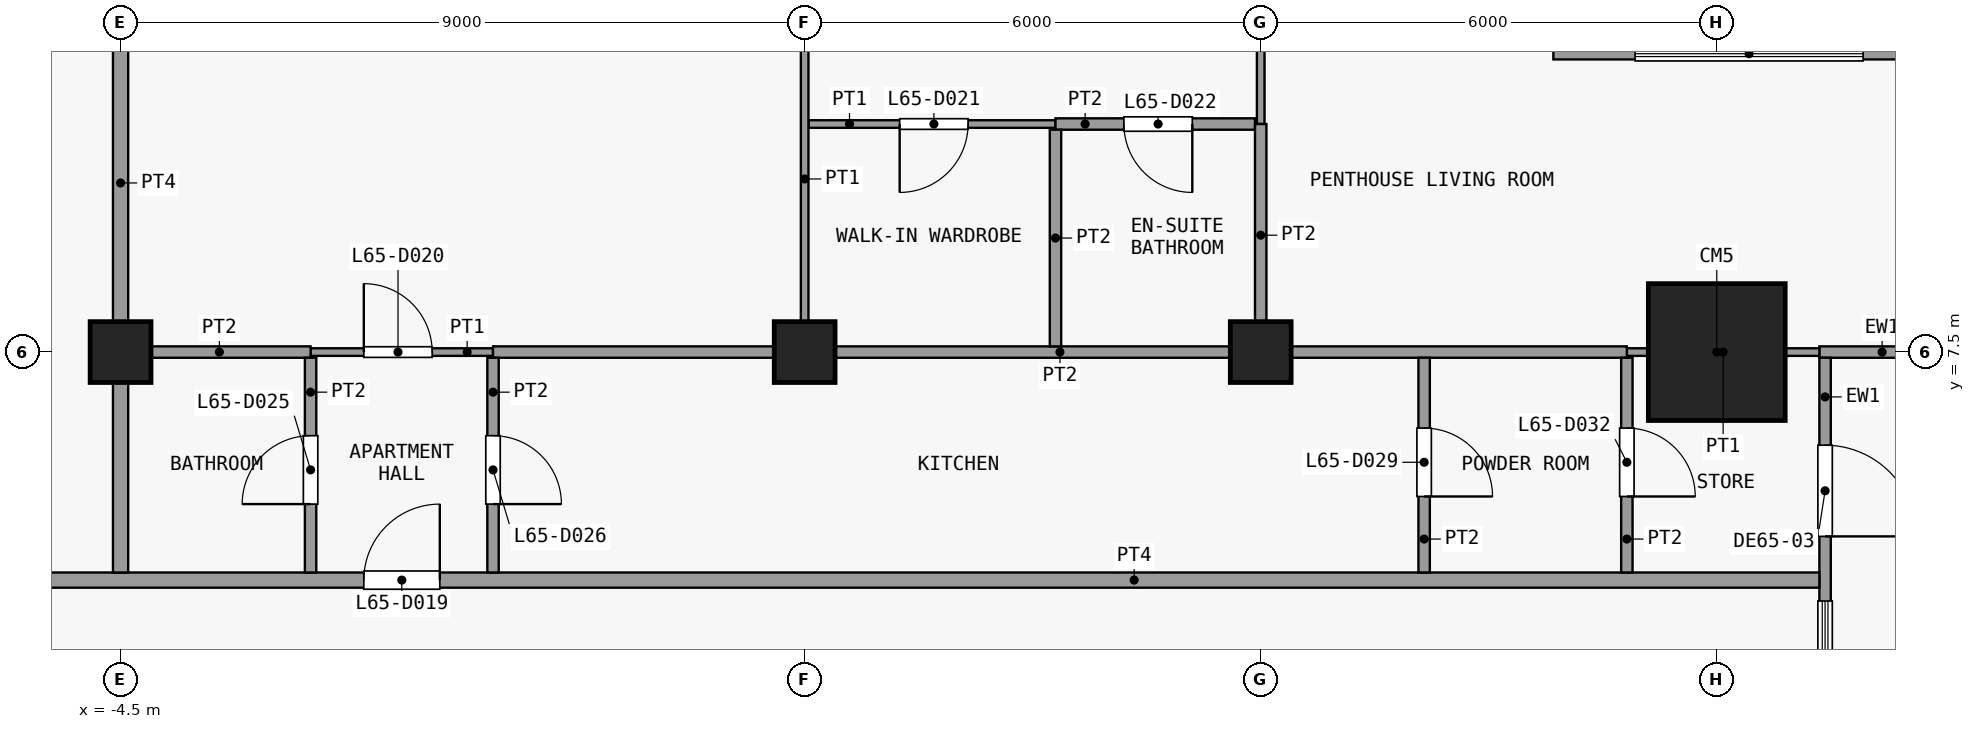
"""IFC4 building model, lengths in metres.
Left out: names, types, materials, properties, quantities, classifications, styles, units other than length and angle.
Written with IfcOpenShell. Run it as: python <this file> out.ifc"""

import sys

from ifc_helpers import new_model, si_unit, direction, frame, frame_2d, origin, origin_2d, place, context, subcontext, project, spatial, rectangle, extrude, element, fill, save


model = new_model("IFC4")
c1 = context("Model", 3, precision=1e-05, world=origin(), true_north=direction((0.0, 1.0)))
c2 = subcontext(c1, "Body", "Model", "MODEL_VIEW")
j1 = project(units=[si_unit("LENGTHUNIT", "METRE"), si_unit("PLANEANGLEUNIT", "RADIAN")], contexts=[c1])
p1 = place(None, origin())
s1 = spatial("IfcSite", under=j1, at=p1, CompositionType="ELEMENT")
p2 = place(p1, origin())
s2 = spatial("IfcBuilding", under=s1, at=p2, CompositionType="ELEMENT")
p3 = place(p2, frame((0.0, 0.0, 259.1)))
s3 = spatial("IfcBuildingStorey", under=s2, at=p3, CompositionType="ELEMENT", Elevation=259.1)
for number, where, z_axis, x_axis in (
    (1, (-4.5, 7.5, 0.0), (0.0, 0.0, 1.0), (1.0, 0.0, 0.0)),
    (2, (4.5, 7.5, 0.0), (0.0, 0.0, 1.0), (1.0, 0.0, 0.0)),
    (3, (10.5, 7.5, 0.0), (0.0, 0.0, 1.0), (1.0, 0.0, 0.0)),
):
    element("IfcColumn", number, at=place(p3, frame(where, z_axis=z_axis, x_axis=x_axis)), inside=s3, PredefinedType="COLUMN", context=c2, shape_type="SweptSolid", body=[
        extrude(rectangle(XDim=0.8, YDim=0.8, at=origin_2d()), origin(), (0.0, 0.0, 1.0), 3.6),
    ])
p4 = place(p3, frame((16.5, 7.5, 0.0), z_axis=(0.0, 0.0, 1.0), x_axis=(1.0, 0.0, 0.0)))
e4 = element("IfcColumn", 4, at=p4, inside=s3, PredefinedType="COLUMN", context=c2, shape_type="SweptSolid", body=[
    extrude(rectangle(XDim=1.8, YDim=1.8, at=origin_2d()), origin(), (0.0, 0.0, 1.0), 3.6),
])
p5 = place(p3, frame((14.35, 11.425, 0.0), z_axis=(0.0, 0.0, 1.0), x_axis=(1.0, 0.0, 0.0)))
e5 = element("IfcWall", 5, at=p5, inside=s3, PredefinedType="SOLIDWALL", context=c2, shape_type="SweptSolid", body=[
    extrude(rectangle(XDim=5.15, YDim=0.15, at=frame_2d((2.575, 0.0))), origin(), (0.0, 0.0, 1.0), 3.3),
])
p6 = place(p5, frame((1.075, 0.0, 0.9)))
e6 = element("IfcOpeningElement", 6, at=p6, cuts=e5, PredefinedType="OPENING", context=c2, shape_type="SweptSolid", body=[
    extrude(rectangle(XDim=3.0, YDim=2.4, at=frame_2d((1.5, 1.2))), frame((0.0, 0.085, 0.0), z_axis=(0.0, -1.0, 0.0), x_axis=(1.0, 0.0, 0.0)), (0.0, 0.0, 1.0), 0.17),
])
p7 = place(p3, frame((17.85, 7.5, 0.0), z_axis=(0.0, 0.0, 1.0), x_axis=(1.0, 0.0, 0.0)))
e7 = element("IfcWall", 7, at=p7, inside=s3, PredefinedType="SOLIDWALL", context=c2, shape_type="SweptSolid", body=[
    extrude(rectangle(XDim=1.65, YDim=0.15, at=frame_2d((0.825, 0.0))), origin(), (0.0, 0.0, 1.0), 3.3),
])
p8 = place(p3, frame((17.925, 7.425, 0.0), z_axis=(0.0, 0.0, 1.0), x_axis=(0.0, -1.0, 0.0)))
e8 = element("IfcWall", 8, at=p8, inside=s3, PredefinedType="SOLIDWALL", context=c2, shape_type="SweptSolid", body=[
    extrude(rectangle(XDim=5.85, YDim=0.15, at=frame_2d((2.925, 0.0))), origin(), (0.0, 0.0, 1.0), 3.3),
])
p9 = place(p8, frame((1.15, 0.0, 0.0)))
e9 = element("IfcOpeningElement", 9, at=p9, cuts=e8, PredefinedType="OPENING", context=c2, shape_type="SweptSolid", body=[
    extrude(rectangle(XDim=1.2, YDim=2.4, at=frame_2d((0.6, 1.2))), frame((0.0, 0.085, 0.0), z_axis=(0.0, -1.0, 0.0), x_axis=(1.0, 0.0, 0.0)), (0.0, 0.0, 1.0), 0.17),
])
p10 = place(p8, frame((3.2, 0.0, 0.9)))
e10 = element("IfcOpeningElement", 10, at=p10, cuts=e8, PredefinedType="OPENING", context=c2, shape_type="SweptSolid", body=[
    extrude(rectangle(XDim=1.8, YDim=2.1, at=frame_2d((0.9, 1.05))), frame((0.0, 0.085, 0.0), z_axis=(0.0, -1.0, 0.0), x_axis=(1.0, 0.0, 0.0)), (0.0, 0.0, 1.0), 0.17),
])
p11 = place(p3, frame((-20.25, 4.5, 0.0), z_axis=(0.0, 0.0, 1.0), x_axis=(1.0, 0.0, 0.0)))
e11 = element("IfcWall", 11, at=p11, inside=s3, PredefinedType="PARTITIONING", context=c2, shape_type="SweptSolid", body=[
    extrude(rectangle(XDim=38.1, YDim=0.2, at=frame_2d((19.05, 0.0))), origin(), (0.0, 0.0, 1.0), 3.3),
])
p12 = place(p11, frame((1.4, 0.0, 0.0)))
e12 = element("IfcOpeningElement", 12, at=p12, cuts=e11, PredefinedType="OPENING", context=c2, shape_type="SweptSolid", body=[
    extrude(rectangle(XDim=0.9, YDim=2.1, at=frame_2d((0.45, 1.05))), frame((0.0, 0.11, 0.0), z_axis=(0.0, -1.0, 0.0), x_axis=(1.0, 0.0, 0.0)), (0.0, 0.0, 1.0), 0.22),
])
p13 = place(p11, frame((6.25, 0.0, 0.0)))
e13 = element("IfcOpeningElement", 13, at=p13, cuts=e11, PredefinedType="OPENING", context=c2, shape_type="SweptSolid", body=[
    extrude(rectangle(XDim=0.9, YDim=2.1, at=frame_2d((0.45, 1.05))), frame((0.0, 0.11, 0.0), z_axis=(0.0, -1.0, 0.0), x_axis=(1.0, 0.0, 0.0)), (0.0, 0.0, 1.0), 0.22),
])
p14 = place(p11, frame((12.25, 0.0, 0.0)))
e14 = element("IfcOpeningElement", 14, at=p14, cuts=e11, PredefinedType="OPENING", context=c2, shape_type="SweptSolid", body=[
    extrude(rectangle(XDim=0.9, YDim=2.1, at=frame_2d((0.45, 1.05))), frame((0.0, 0.11, 0.0), z_axis=(0.0, -1.0, 0.0), x_axis=(1.0, 0.0, 0.0)), (0.0, 0.0, 1.0), 0.22),
])
p15 = place(p11, frame((18.95, 0.0, 0.0)))
e15 = element("IfcOpeningElement", 15, at=p15, cuts=e11, PredefinedType="OPENING", context=c2, shape_type="SweptSolid", body=[
    extrude(rectangle(XDim=1.0, YDim=2.1, at=frame_2d((0.5, 1.05))), frame((0.0, 0.11, 0.0), z_axis=(0.0, -1.0, 0.0), x_axis=(1.0, 0.0, 0.0)), (0.0, 0.0, 1.0), 0.22),
])
p16 = place(p3, frame((-2.0, 7.5, 0.0), z_axis=(0.0, 0.0, 1.0), x_axis=(1.0, 0.0, 0.0)))
e16 = element("IfcWall", 16, at=p16, inside=s3, PredefinedType="PARTITIONING", context=c2, shape_type="SweptSolid", body=[
    extrude(rectangle(XDim=2.4, YDim=0.1, at=frame_2d((1.2, 0.0))), origin(), (0.0, 0.0, 1.0), 3.3),
])
p17 = place(p16, frame((0.7, 0.0, 0.0)))
e17 = element("IfcOpeningElement", 17, at=p17, cuts=e16, PredefinedType="OPENING", context=c2, shape_type="SweptSolid", body=[
    extrude(rectangle(XDim=0.9, YDim=2.1, at=frame_2d((0.45, 1.05))), frame((0.0, 0.06, 0.0), z_axis=(0.0, -1.0, 0.0), x_axis=(1.0, 0.0, 0.0)), (0.0, 0.0, 1.0), 0.12),
])
p18 = place(p3, frame((15.317, 7.5, 0.0), z_axis=(0.0, 0.0, 1.0), x_axis=(1.0, 0.0, 0.0)))
e18 = element("IfcWall", 18, at=p18, inside=s3, PredefinedType="PARTITIONING", context=c2, shape_type="SweptSolid", body=[
    extrude(rectangle(XDim=2.533, YDim=0.1, at=frame_2d((1.267, 0.0))), origin(), (0.0, 0.0, 1.0), 3.3),
])
p19 = place(p3, frame((-4.4, 7.5, 0.0), z_axis=(0.0, 0.0, 1.0), x_axis=(1.0, 0.0, 0.0)))
e19 = element("IfcWall", 19, at=p19, inside=s3, PredefinedType="PARTITIONING", context=c2, shape_type="SweptSolid", body=[
    extrude(rectangle(XDim=2.4, YDim=0.15, at=frame_2d((1.2, 0.0))), origin(), (0.0, 0.0, 1.0), 3.3),
])
p20 = place(p3, frame((0.4, 7.5, 0.0), z_axis=(0.0, 0.0, 1.0), x_axis=(1.0, 0.0, 0.0)))
e20 = element("IfcWall", 20, at=p20, inside=s3, PredefinedType="PARTITIONING", context=c2, shape_type="SweptSolid", body=[
    extrude(rectangle(XDim=14.917, YDim=0.15, at=frame_2d((7.458, 0.0))), origin(), (0.0, 0.0, 1.0), 3.3),
])
p21 = place(p3, frame((4.55, 10.5, 0.0), z_axis=(0.0, 0.0, 1.0), x_axis=(1.0, 0.0, 0.0)))
e21 = element("IfcWall", 21, at=p21, inside=s3, PredefinedType="PARTITIONING", context=c2, shape_type="SweptSolid", body=[
    extrude(rectangle(XDim=3.25, YDim=0.1, at=frame_2d((1.625, 0.0))), origin(), (0.0, 0.0, 1.0), 3.3),
])
p22 = place(p21, frame((1.2, 0.0, 0.0)))
e22 = element("IfcOpeningElement", 22, at=p22, cuts=e21, PredefinedType="OPENING", context=c2, shape_type="SweptSolid", body=[
    extrude(rectangle(XDim=0.9, YDim=2.1, at=frame_2d((0.45, 1.05))), frame((0.0, 0.06, 0.0), z_axis=(0.0, -1.0, 0.0), x_axis=(1.0, 0.0, 0.0)), (0.0, 0.0, 1.0), 0.12),
])
p23 = place(p3, frame((7.8, 10.5, 0.0), z_axis=(0.0, 0.0, 1.0), x_axis=(1.0, 0.0, 0.0)))
e23 = element("IfcWall", 23, at=p23, inside=s3, PredefinedType="PARTITIONING", context=c2, shape_type="SweptSolid", body=[
    extrude(rectangle(XDim=2.625, YDim=0.15, at=frame_2d((1.312, 0.0))), origin(), (0.0, 0.0, 1.0), 3.3),
])
p24 = place(p23, frame((0.9, 0.0, 0.0)))
e24 = element("IfcOpeningElement", 24, at=p24, cuts=e23, PredefinedType="OPENING", context=c2, shape_type="SweptSolid", body=[
    extrude(rectangle(XDim=0.9, YDim=2.1, at=frame_2d((0.45, 1.05))), frame((0.0, 0.085, 0.0), z_axis=(0.0, -1.0, 0.0), x_axis=(1.0, 0.0, 0.0)), (0.0, 0.0, 1.0), 0.17),
])
p25 = place(p3, frame((-4.5, 4.6, 0.0), z_axis=(0.0, 0.0, 1.0), x_axis=(0.0, 1.0, 0.0)))
e25 = element("IfcWall", 25, at=p25, inside=s3, PredefinedType="PARTITIONING", context=c2, shape_type="SweptSolid", body=[
    extrude(rectangle(XDim=10.25, YDim=0.2, at=frame_2d((5.125, 0.0))), origin(), (0.0, 0.0, 1.0), 3.3),
])
p26 = place(p3, frame((-2.0, 4.6, 0.0), z_axis=(0.0, 0.0, 1.0), x_axis=(0.0, 1.0, 0.0)))
e26 = element("IfcWall", 26, at=p26, inside=s3, PredefinedType="PARTITIONING", context=c2, shape_type="SweptSolid", body=[
    extrude(rectangle(XDim=2.825, YDim=0.15, at=frame_2d((1.413, 0.0))), origin(), (0.0, 0.0, 1.0), 3.3),
])
p27 = place(p26, frame((0.9, 0.0, 0.0)))
e27 = element("IfcOpeningElement", 27, at=p27, cuts=e26, PredefinedType="OPENING", context=c2, shape_type="SweptSolid", body=[
    extrude(rectangle(XDim=0.9, YDim=2.1, at=frame_2d((0.45, 1.05))), frame((0.0, 0.085, 0.0), z_axis=(0.0, -1.0, 0.0), x_axis=(1.0, 0.0, 0.0)), (0.0, 0.0, 1.0), 0.17),
])
p28 = place(p3, frame((0.4, 4.6, 0.0), z_axis=(0.0, 0.0, 1.0), x_axis=(0.0, 1.0, 0.0)))
e28 = element("IfcWall", 28, at=p28, inside=s3, PredefinedType="PARTITIONING", context=c2, shape_type="SweptSolid", body=[
    extrude(rectangle(XDim=2.825, YDim=0.15, at=frame_2d((1.413, 0.0))), origin(), (0.0, 0.0, 1.0), 3.3),
])
p29 = place(p28, frame((0.9, 0.0, 0.0)))
e29 = element("IfcOpeningElement", 29, at=p29, cuts=e28, PredefinedType="OPENING", context=c2, shape_type="SweptSolid", body=[
    extrude(rectangle(XDim=0.9, YDim=2.1, at=frame_2d((0.45, 1.05))), frame((0.0, 0.085, 0.0), z_axis=(0.0, -1.0, 0.0), x_axis=(1.0, 0.0, 0.0)), (0.0, 0.0, 1.0), 0.17),
])
p30 = place(p3, frame((4.5, 7.575, 0.0), z_axis=(0.0, 0.0, 1.0), x_axis=(0.0, 1.0, 0.0)))
e30 = element("IfcWall", 30, at=p30, inside=s3, PredefinedType="PARTITIONING", context=c2, shape_type="SweptSolid", body=[
    extrude(rectangle(XDim=7.275, YDim=0.1, at=frame_2d((3.638, 0.0))), origin(), (0.0, 0.0, 1.0), 3.3),
])
p31 = place(p30, frame((4.525, 0.0, 0.0)))
e31 = element("IfcOpeningElement", 31, at=p31, cuts=e30, PredefinedType="OPENING", context=c2, shape_type="SweptSolid", body=[
    extrude(rectangle(XDim=0.9, YDim=2.1, at=frame_2d((0.45, 1.05))), frame((0.0, 0.06, 0.0), z_axis=(0.0, -1.0, 0.0), x_axis=(1.0, 0.0, 0.0)), (0.0, 0.0, 1.0), 0.12),
])
p32 = place(p3, frame((7.8, 7.575, 0.0), z_axis=(0.0, 0.0, 1.0), x_axis=(0.0, 1.0, 0.0)))
e32 = element("IfcWall", 32, at=p32, inside=s3, PredefinedType="PARTITIONING", context=c2, shape_type="SweptSolid", body=[
    extrude(rectangle(XDim=2.85, YDim=0.15, at=frame_2d((1.425, 0.0))), origin(), (0.0, 0.0, 1.0), 3.3),
])
p33 = place(p3, frame((10.5, 10.5, 0.0), z_axis=(0.0, 0.0, 1.0), x_axis=(0.0, 1.0, 0.0)))
e33 = element("IfcWall", 33, at=p33, inside=s3, PredefinedType="PARTITIONING", context=c2, shape_type="SweptSolid", body=[
    extrude(rectangle(XDim=4.35, YDim=0.1, at=frame_2d((2.175, 0.0))), origin(), (0.0, 0.0, 1.0), 3.3),
])
p34 = place(p33, frame((1.6, 0.0, 0.0)))
e34 = element("IfcOpeningElement", 34, at=p34, cuts=e33, PredefinedType="OPENING", context=c2, shape_type="SweptSolid", body=[
    extrude(rectangle(XDim=0.9, YDim=2.1, at=frame_2d((0.45, 1.05))), frame((0.0, 0.06, 0.0), z_axis=(0.0, -1.0, 0.0), x_axis=(1.0, 0.0, 0.0)), (0.0, 0.0, 1.0), 0.12),
])
p35 = place(p3, frame((10.5, 7.575, 0.0), z_axis=(0.0, 0.0, 1.0), x_axis=(0.0, 1.0, 0.0)))
e35 = element("IfcWall", 35, at=p35, inside=s3, PredefinedType="PARTITIONING", context=c2, shape_type="SweptSolid", body=[
    extrude(rectangle(XDim=2.925, YDim=0.15, at=frame_2d((1.462, 0.0))), origin(), (0.0, 0.0, 1.0), 3.3),
])
p36 = place(p3, frame((12.65, 4.6, 0.0), z_axis=(0.0, 0.0, 1.0), x_axis=(0.0, 1.0, 0.0)))
e36 = element("IfcWall", 36, at=p36, inside=s3, PredefinedType="PARTITIONING", context=c2, shape_type="SweptSolid", body=[
    extrude(rectangle(XDim=2.825, YDim=0.15, at=frame_2d((1.413, 0.0))), origin(), (0.0, 0.0, 1.0), 3.3),
])
p37 = place(p36, frame((1.0, 0.0, 0.0)))
e37 = element("IfcOpeningElement", 37, at=p37, cuts=e36, PredefinedType="OPENING", context=c2, shape_type="SweptSolid", body=[
    extrude(rectangle(XDim=0.9, YDim=2.1, at=frame_2d((0.45, 1.05))), frame((0.0, 0.085, 0.0), z_axis=(0.0, -1.0, 0.0), x_axis=(1.0, 0.0, 0.0)), (0.0, 0.0, 1.0), 0.17),
])
p38 = place(p3, frame((15.317, 4.6, 0.0), z_axis=(0.0, 0.0, 1.0), x_axis=(0.0, 1.0, 0.0)))
e38 = element("IfcWall", 38, at=p38, inside=s3, PredefinedType="PARTITIONING", context=c2, shape_type="SweptSolid", body=[
    extrude(rectangle(XDim=2.825, YDim=0.15, at=frame_2d((1.413, 0.0))), origin(), (0.0, 0.0, 1.0), 3.3),
])
p39 = place(p38, frame((1.0, 0.0, 0.0)))
e39 = element("IfcOpeningElement", 39, at=p39, cuts=e38, PredefinedType="OPENING", context=c2, shape_type="SweptSolid", body=[
    extrude(rectangle(XDim=0.9, YDim=2.1, at=frame_2d((0.45, 1.05))), frame((0.0, 0.085, 0.0), z_axis=(0.0, -1.0, 0.0), x_axis=(1.0, 0.0, 0.0)), (0.0, 0.0, 1.0), 0.17),
])
p40 = place(p6, origin())
e40 = element("IfcWindow", 40, at=p40, inside=s3, PartitioningType="SINGLE_PANEL", PredefinedType="WINDOW", context=c2, shape_type="SweptSolid", body=[
    extrude(rectangle(XDim=3.0, YDim=2.4, at=frame_2d((1.5, 1.2))), frame((0.0, 0.03, 0.0), z_axis=(0.0, -1.0, 0.0), x_axis=(1.0, 0.0, 0.0)), (0.0, 0.0, 1.0), 0.06),
])
fill(e6, e40)
p41 = place(p9, origin())
e41 = element("IfcDoor", 41, at=p41, inside=s3, OperationType="SINGLE_SWING_RIGHT", PredefinedType="DOOR", context=c2, shape_type="SweptSolid", body=[
    extrude(rectangle(XDim=1.2, YDim=2.4, at=frame_2d((0.6, 1.2))), frame((0.0, 0.025, 0.0), z_axis=(0.0, -1.0, 0.0), x_axis=(1.0, 0.0, 0.0)), (0.0, 0.0, 1.0), 0.05),
])
fill(e9, e41)
p42 = place(p10, origin())
e42 = element("IfcWindow", 42, at=p42, inside=s3, PartitioningType="SINGLE_PANEL", PredefinedType="WINDOW", context=c2, shape_type="SweptSolid", body=[
    extrude(rectangle(XDim=1.8, YDim=2.1, at=frame_2d((0.9, 1.05))), frame((0.0, 0.03, 0.0), z_axis=(0.0, -1.0, 0.0), x_axis=(1.0, 0.0, 0.0)), (0.0, 0.0, 1.0), 0.06),
])
fill(e10, e42)
p43 = place(p15, origin())
e43 = element("IfcDoor", 43, at=p43, inside=s3, OperationType="SINGLE_SWING_LEFT", PredefinedType="DOOR", context=c2, shape_type="SweptSolid", body=[
    extrude(rectangle(XDim=1.0, YDim=2.1, at=frame_2d((0.5, 1.05))), frame((0.0, 0.025, 0.0), z_axis=(0.0, -1.0, 0.0), x_axis=(1.0, 0.0, 0.0)), (0.0, 0.0, 1.0), 0.05),
])
fill(e15, e43)
p44 = place(p17, origin())
e44 = element("IfcDoor", 44, at=p44, inside=s3, OperationType="SINGLE_SWING_RIGHT", PredefinedType="DOOR", context=c2, shape_type="SweptSolid", body=[
    extrude(rectangle(XDim=0.9, YDim=2.1, at=frame_2d((0.45, 1.05))), frame((0.0, 0.025, 0.0), z_axis=(0.0, -1.0, 0.0), x_axis=(1.0, 0.0, 0.0)), (0.0, 0.0, 1.0), 0.05),
])
fill(e17, e44)
p45 = place(p22, origin())
e45 = element("IfcDoor", 45, at=p45, inside=s3, OperationType="SINGLE_SWING_LEFT", PredefinedType="DOOR", context=c2, shape_type="SweptSolid", body=[
    extrude(rectangle(XDim=0.9, YDim=2.1, at=frame_2d((0.45, 1.05))), frame((0.0, 0.025, 0.0), z_axis=(0.0, -1.0, 0.0), x_axis=(1.0, 0.0, 0.0)), (0.0, 0.0, 1.0), 0.05),
])
fill(e22, e45)
p46 = place(p24, origin())
e46 = element("IfcDoor", 46, at=p46, inside=s3, OperationType="SINGLE_SWING_RIGHT", PredefinedType="DOOR", context=c2, shape_type="SweptSolid", body=[
    extrude(rectangle(XDim=0.9, YDim=2.1, at=frame_2d((0.45, 1.05))), frame((0.0, 0.025, 0.0), z_axis=(0.0, -1.0, 0.0), x_axis=(1.0, 0.0, 0.0)), (0.0, 0.0, 1.0), 0.05),
])
fill(e24, e46)
p47 = place(p27, origin())
e47 = element("IfcDoor", 47, at=p47, inside=s3, OperationType="SINGLE_SWING_RIGHT", PredefinedType="DOOR", context=c2, shape_type="SweptSolid", body=[
    extrude(rectangle(XDim=0.9, YDim=2.1, at=frame_2d((0.45, 1.05))), frame((0.0, 0.025, 0.0), z_axis=(0.0, -1.0, 0.0), x_axis=(1.0, 0.0, 0.0)), (0.0, 0.0, 1.0), 0.05),
])
fill(e27, e47)
p48 = place(p29, origin())
e48 = element("IfcDoor", 48, at=p48, inside=s3, OperationType="SINGLE_SWING_LEFT", PredefinedType="DOOR", context=c2, shape_type="SweptSolid", body=[
    extrude(rectangle(XDim=0.9, YDim=2.1, at=frame_2d((0.45, 1.05))), frame((0.0, 0.025, 0.0), z_axis=(0.0, -1.0, 0.0), x_axis=(1.0, 0.0, 0.0)), (0.0, 0.0, 1.0), 0.05),
])
fill(e29, e48)
p49 = place(p37, origin())
e49 = element("IfcDoor", 49, at=p49, inside=s3, OperationType="SINGLE_SWING_LEFT", PredefinedType="DOOR", context=c2, shape_type="SweptSolid", body=[
    extrude(rectangle(XDim=0.9, YDim=2.1, at=frame_2d((0.45, 1.05))), frame((0.0, 0.025, 0.0), z_axis=(0.0, -1.0, 0.0), x_axis=(1.0, 0.0, 0.0)), (0.0, 0.0, 1.0), 0.05),
])
fill(e37, e49)
p50 = place(p39, origin())
e50 = element("IfcDoor", 50, at=p50, inside=s3, OperationType="SINGLE_SWING_LEFT", PredefinedType="DOOR", context=c2, shape_type="SweptSolid", body=[
    extrude(rectangle(XDim=0.9, YDim=2.1, at=frame_2d((0.45, 1.05))), frame((0.0, 0.025, 0.0), z_axis=(0.0, -1.0, 0.0), x_axis=(1.0, 0.0, 0.0)), (0.0, 0.0, 1.0), 0.05),
])
fill(e39, e50)
save(model, sys.argv[1])
